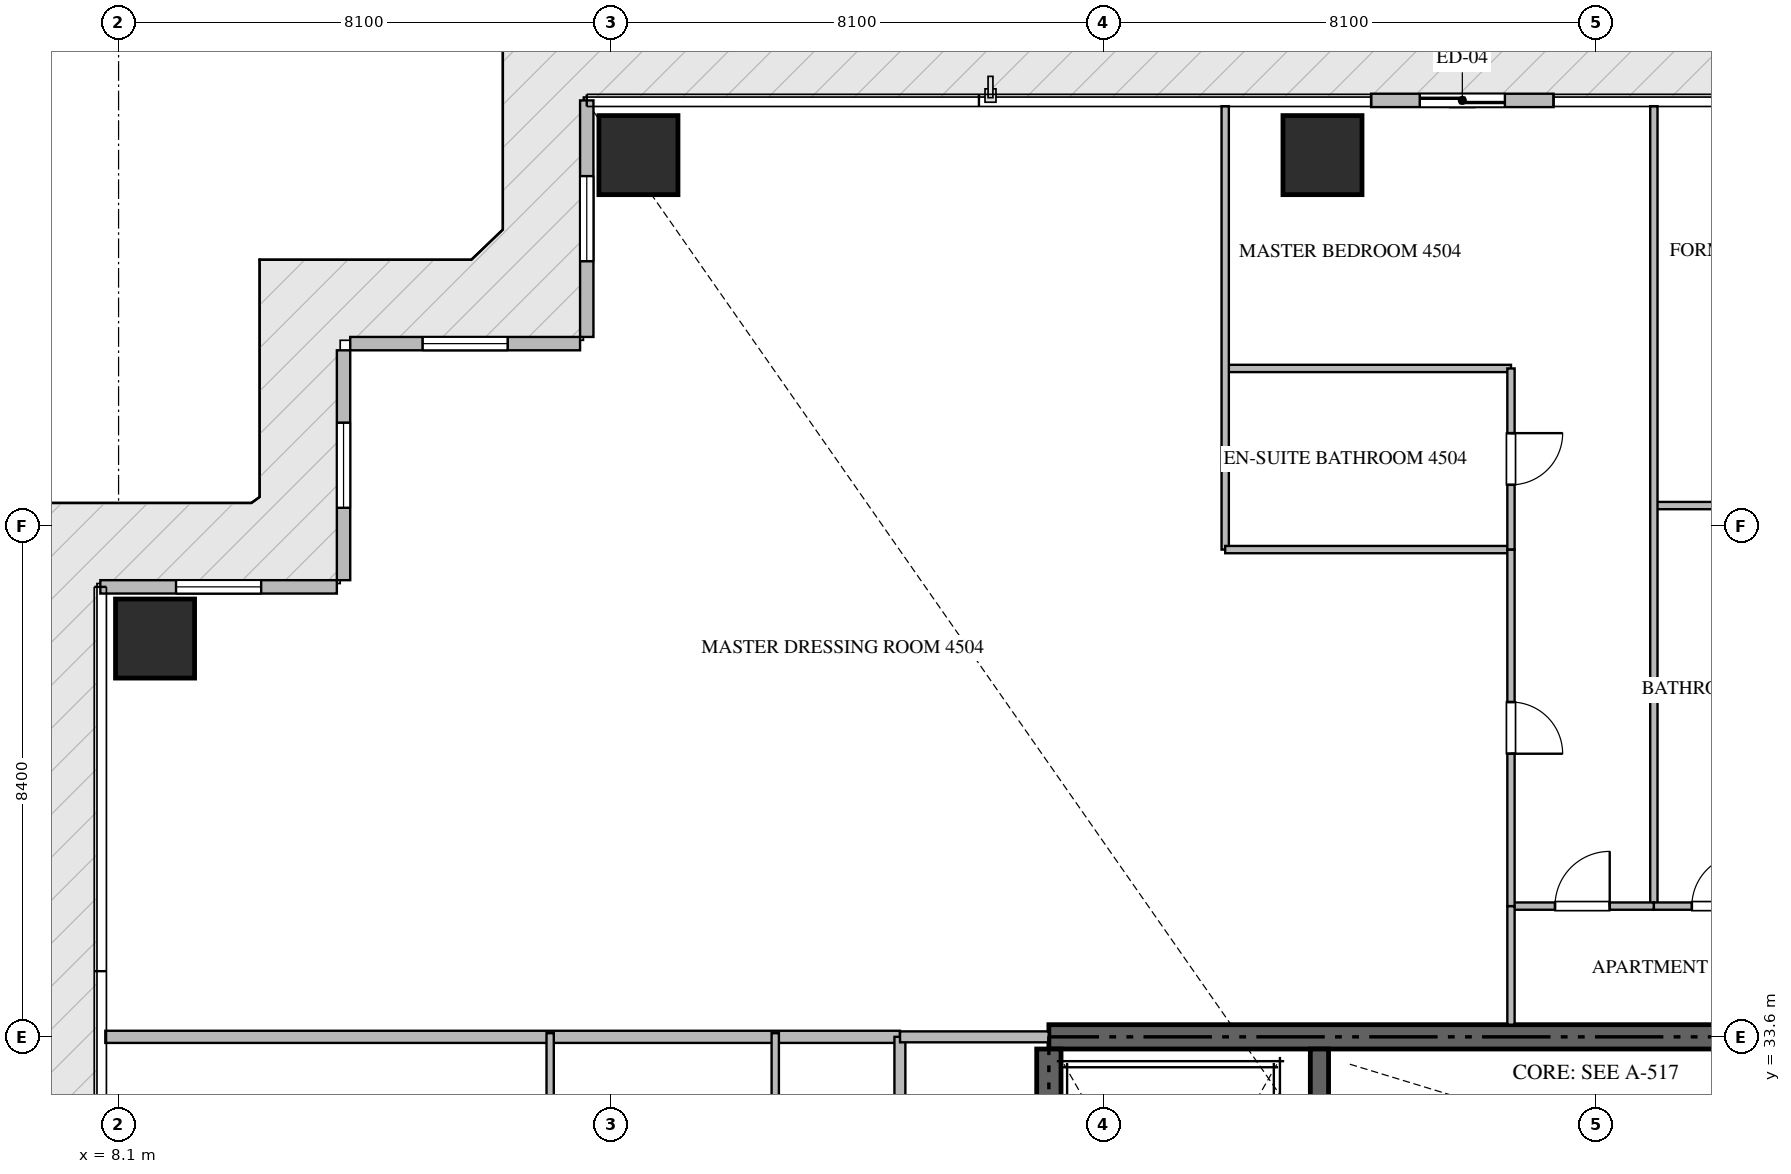
"""IFC4 building model, lengths in metres.
Left out: names, types, materials, properties, quantities, classifications, styles, units other than length and angle.
Written with IfcOpenShell. Run it as: python <this file> out.ifc"""

import sys

from ifc_helpers import new_model, si_unit, direction, frame, frame_2d, origin, origin_2d, place, context, subcontext, project, spatial, rectangle, extrude, source, transform, mapped, element, fill, save


model = new_model("IFC4")
c1 = context("Model", 3, precision=1e-05, world=origin(), true_north=direction((0.0, 1.0)))
c2 = subcontext(c1, "Body", "Model", "MODEL_VIEW")
j1 = project(units=[si_unit("LENGTHUNIT", "METRE"), si_unit("PLANEANGLEUNIT", "RADIAN")], contexts=[c1])
p1 = place(None, origin())
s1 = spatial("IfcSite", under=j1, at=p1, CompositionType="ELEMENT")
p2 = place(p1, origin())
s2 = spatial("IfcBuilding", under=s1, at=p2, CompositionType="ELEMENT")
p3 = place(p2, frame((0.0, 0.0, 180.15)))
s3 = spatial("IfcBuildingStorey", under=s2, at=p3, CompositionType="ELEMENT", Elevation=180.15)
p4 = place(p3, frame((41.4, 33.6, -0.26), z_axis=(0.0, 0.0, 1.0), x_axis=(-1.0, 0.0, 0.0)))
e1 = element("IfcWall", 1, at=p4, inside=s3, PredefinedType="SHEAR", context=c2, shape_type="SweptSolid", body=[
    extrude(rectangle(XDim=18.0, YDim=0.4, at=frame_2d((9.0, 0.0))), origin(), (0.0, 0.0, 1.0), 3.748),
])
p5 = place(p3, frame((23.4, 24.25, -0.26), z_axis=(0.0, 0.0, 1.0), x_axis=(0.0, 1.0, 0.0)))
e2 = element("IfcWall", 2, at=p5, inside=s3, PredefinedType="SHEAR", context=c2, shape_type="SweptSolid", body=[
    extrude(rectangle(XDim=9.15, YDim=0.4, at=frame_2d((4.575, 0.0))), origin(), (0.0, 0.0, 1.0), 3.748),
])
p6 = place(p3, frame((27.85, 23.55, -0.26), z_axis=(0.0, 0.0, 1.0), x_axis=(0.0, 1.0, 0.0)))
e3 = element("IfcWall", 3, at=p6, inside=s3, PredefinedType="SHEAR", context=c2, shape_type="SweptSolid", body=[
    extrude(rectangle(XDim=9.85, YDim=0.3, at=frame_2d((4.925, 0.0))), origin(), (0.0, 0.0, 1.0), 3.748),
])
m1 = source(origin(), c2, "Body", "SweptSolid", [
    extrude(rectangle(XDim=1.3, YDim=1.3, at=origin_2d()), origin(), (0.0, 0.0, 1.0), 3.75),
])
for number, where, z_axis, x_axis in (
    (4, (16.65, 48.1, -0.26), (0.0, 0.0, 1.0), (1.0, 0.0, 0.0)),
    (5, (27.9, 48.1, -0.26), (0.0, 0.0, 1.0), (1.0, 0.0, 0.0)),
    (6, (8.7, 40.15, -0.26), (0.0, 0.0, 1.0), (1.0, 0.0, 0.0)),
):
    element("IfcColumn", number, at=place(p3, frame(where, z_axis=z_axis, x_axis=x_axis)), inside=s3, PredefinedType="COLUMN", context=c2, shape_type="MappedRepresentation", body=[
        mapped(m1, transform((0.0, 0.0, 0.0), scale=1.0)),
    ])
p7 = place(p3, frame((31.7, 49.0, 0.0), z_axis=(0.0, 0.0, 1.0), x_axis=(-1.0, 0.0, 0.0)))
e7 = element("IfcWall", 7, at=p7, inside=s3, PredefinedType="ELEMENTEDWALL", context=c2, shape_type="SweptSolid", body=[
    extrude(rectangle(XDim=3.0, YDim=0.22, at=frame_2d((1.5, 0.0))), origin(), (0.0, 0.0, 1.0), 3.475),
])
p8 = place(p7, frame((0.8, 0.0, 0.0)))
e8 = element("IfcOpeningElement", 8, at=p8, cuts=e7, PredefinedType="OPENING", context=c2, shape_type="SweptSolid", body=[
    extrude(rectangle(XDim=1.4, YDim=2.25, at=frame_2d((0.7, 1.125))), frame((0.0, 0.12, 0.0), z_axis=(0.0, -1.0, 0.0), x_axis=(1.0, 0.0, 0.0)), (0.0, 0.0, 1.0), 0.24),
])
p9 = place(p3, frame((15.8, 49.0, 0.0), z_axis=(0.0, 0.0, 1.0), x_axis=(0.0, -1.0, 0.0)))
e9 = element("IfcWall", 9, at=p9, inside=s3, PredefinedType="ELEMENTEDWALL", context=c2, shape_type="SweptSolid", body=[
    extrude(rectangle(XDim=3.89, YDim=0.22, at=frame_2d((1.945, 0.0))), origin(), (0.0, 0.0, 1.0), 3.475),
])
p10 = place(p9, frame((1.245, 0.0, 0.65)))
e10 = element("IfcOpeningElement", 10, at=p10, cuts=e9, PredefinedType="OPENING", context=c2, shape_type="SweptSolid", body=[
    extrude(rectangle(XDim=1.4, YDim=2.05, at=frame_2d((0.7, 1.025))), frame((0.0, 0.12, 0.0), z_axis=(0.0, -1.0, 0.0), x_axis=(1.0, 0.0, 0.0)), (0.0, 0.0, 1.0), 0.24),
])
p11 = place(p3, frame((15.69, 45.0, 0.0), z_axis=(0.0, 0.0, 1.0), x_axis=(-1.0, 0.0, 0.0)))
e11 = element("IfcWall", 11, at=p11, inside=s3, PredefinedType="ELEMENTEDWALL", context=c2, shape_type="SweptSolid", body=[
    extrude(rectangle(XDim=3.78, YDim=0.22, at=frame_2d((1.89, 0.0))), origin(), (0.0, 0.0, 1.0), 3.475),
])
p12 = place(p11, frame((1.19, 0.0, 0.65)))
e12 = element("IfcOpeningElement", 12, at=p12, cuts=e11, PredefinedType="OPENING", context=c2, shape_type="SweptSolid", body=[
    extrude(rectangle(XDim=1.4, YDim=2.05, at=frame_2d((0.7, 1.025))), frame((0.0, 0.12, 0.0), z_axis=(0.0, -1.0, 0.0), x_axis=(1.0, 0.0, 0.0)), (0.0, 0.0, 1.0), 0.24),
])
p13 = place(p3, frame((11.8, 44.89, 0.0), z_axis=(0.0, 0.0, 1.0), x_axis=(0.0, -1.0, 0.0)))
e13 = element("IfcWall", 13, at=p13, inside=s3, PredefinedType="ELEMENTEDWALL", context=c2, shape_type="SweptSolid", body=[
    extrude(rectangle(XDim=3.78, YDim=0.22, at=frame_2d((1.89, 0.0))), origin(), (0.0, 0.0, 1.0), 3.475),
])
p14 = place(p13, frame((1.19, 0.0, 0.65)))
e14 = element("IfcOpeningElement", 14, at=p14, cuts=e13, PredefinedType="OPENING", context=c2, shape_type="SweptSolid", body=[
    extrude(rectangle(XDim=1.4, YDim=2.05, at=frame_2d((0.7, 1.025))), frame((0.0, 0.12, 0.0), z_axis=(0.0, -1.0, 0.0), x_axis=(1.0, 0.0, 0.0)), (0.0, 0.0, 1.0), 0.24),
])
p15 = place(p3, frame((11.69, 41.0, 0.0), z_axis=(0.0, 0.0, 1.0), x_axis=(-1.0, 0.0, 0.0)))
e15 = element("IfcWall", 15, at=p15, inside=s3, PredefinedType="ELEMENTEDWALL", context=c2, shape_type="SweptSolid", body=[
    extrude(rectangle(XDim=3.89, YDim=0.22, at=frame_2d((1.945, 0.0))), origin(), (0.0, 0.0, 1.0), 3.475),
])
p16 = place(p15, frame((1.245, 0.0, 0.65)))
e16 = element("IfcOpeningElement", 16, at=p16, cuts=e15, PredefinedType="OPENING", context=c2, shape_type="SweptSolid", body=[
    extrude(rectangle(XDim=1.4, YDim=2.05, at=frame_2d((0.7, 1.025))), frame((0.0, 0.12, 0.0), z_axis=(0.0, -1.0, 0.0), x_axis=(1.0, 0.0, 0.0)), (0.0, 0.0, 1.0), 0.24),
])
p17 = place(p3, frame((7.882, 33.6, 0.0), z_axis=(0.0, 0.0, 1.0), x_axis=(1.0, 0.0, 0.0)))
e17 = element("IfcWall", 17, at=p17, inside=s3, PredefinedType="PARTITIONING", context=c2, shape_type="SweptSolid", body=[
    extrude(rectangle(XDim=13.068, YDim=0.2, at=frame_2d((6.534, 0.0))), origin(), (0.0, 0.0, 1.0), 3.49),
])
p18 = place(p3, frame((20.95, 14.9, 0.0), z_axis=(0.0, 0.0, 1.0), x_axis=(0.0, 1.0, 0.0)))
e18 = element("IfcWall", 18, at=p18, inside=s3, PredefinedType="PARTITIONING", context=c2, shape_type="SweptSolid", body=[
    extrude(rectangle(XDim=18.7, YDim=0.18, at=frame_2d((9.35, 0.0))), origin(), (0.0, 0.0, 1.0), 3.49),
])
p19 = place(p18, frame((5.629, 0.0, 0.0)))
e19 = element("IfcOpeningElement", 19, at=p19, cuts=e18, PredefinedType="OPENING", context=c2, shape_type="SweptSolid", body=[
    extrude(rectangle(XDim=1.0, YDim=2.15, at=frame_2d((0.5, 1.075))), frame((0.0, 0.1, 0.0), z_axis=(0.0, -1.0, 0.0), x_axis=(1.0, 0.0, 0.0)), (0.0, 0.0, 1.0), 0.2),
])
p20 = place(p18, frame((10.709, 0.0, 0.0)))
e20 = element("IfcOpeningElement", 20, at=p20, cuts=e18, PredefinedType="OPENING", context=c2, shape_type="SweptSolid", body=[
    extrude(rectangle(XDim=1.0, YDim=2.15, at=frame_2d((0.5, 1.075))), frame((0.0, 0.1, 0.0), z_axis=(0.0, -1.0, 0.0), x_axis=(1.0, 0.0, 0.0)), (0.0, 0.0, 1.0), 0.2),
])
p21 = place(p3, frame((20.952, 33.6, 0.0), z_axis=(0.0, 0.0, 1.0), x_axis=(1.0, 0.0, 0.0)))
e21 = element("IfcWall", 21, at=p21, inside=s3, PredefinedType="PARTITIONING", context=c2, shape_type="SweptSolid", body=[
    extrude(rectangle(XDim=2.446, YDim=0.18, at=frame_2d((1.223, 0.0))), origin(), (0.0, 0.0, 1.0), 3.49),
])
p22 = place(p3, frame((33.35, 42.337, 0.0), z_axis=(0.0, 0.0, 1.0), x_axis=(1.0, 0.0, 0.0)))
e22 = element("IfcWall", 22, at=p22, inside=s3, PredefinedType="PARTITIONING", context=c2, shape_type="SweptSolid", body=[
    extrude(rectangle(XDim=5.15, YDim=0.12, at=frame_2d((2.575, 0.0))), origin(), (0.0, 0.0, 1.0), 3.49),
])
p23 = place(p3, frame((33.35, 48.905, 0.0), z_axis=(0.0, 0.0, 1.0), x_axis=(0.0, -1.0, 0.0)))
e23 = element("IfcWall", 23, at=p23, inside=s3, PredefinedType="PARTITIONING", context=c2, shape_type="SweptSolid", body=[
    extrude(rectangle(XDim=13.155, YDim=0.12, at=frame_2d((6.578, 0.0))), origin(), (0.0, 0.0, 1.0), 3.49),
])
p24 = place(p3, frame((33.35, 35.75, 0.0), z_axis=(0.0, 0.0, 1.0), x_axis=(1.0, 0.0, 0.0)))
e24 = element("IfcWall", 24, at=p24, inside=s3, PredefinedType="PARTITIONING", context=c2, shape_type="SweptSolid", body=[
    extrude(rectangle(XDim=2.1, YDim=0.12, at=frame_2d((1.05, 0.0))), origin(), (0.0, 0.0, 1.0), 3.49),
])
p25 = place(p24, frame((0.625, 0.0, 0.0)))
e25 = element("IfcOpeningElement", 25, at=p25, cuts=e24, PredefinedType="OPENING", context=c2, shape_type="SweptSolid", body=[
    extrude(rectangle(XDim=0.85, YDim=2.1, at=frame_2d((0.425, 1.05))), frame((0.0, 0.07, 0.0), z_axis=(0.0, -1.0, 0.0), x_axis=(1.0, 0.0, 0.0)), (0.0, 0.0, 1.0), 0.14),
])
p26 = place(p3, frame((31.0, 35.75, 0.0), z_axis=(0.0, 0.0, 1.0), x_axis=(1.0, 0.0, 0.0)))
e26 = element("IfcWall", 26, at=p26, inside=s3, PredefinedType="PARTITIONING", context=c2, shape_type="SweptSolid", body=[
    extrude(rectangle(XDim=2.348, YDim=0.12, at=frame_2d((1.174, 0.0))), origin(), (0.0, 0.0, 1.0), 3.49),
])
p27 = place(p26, frame((0.724, 0.0, 0.0)))
e27 = element("IfcOpeningElement", 27, at=p27, cuts=e26, PredefinedType="OPENING", context=c2, shape_type="SweptSolid", body=[
    extrude(rectangle(XDim=0.9, YDim=2.1, at=frame_2d((0.45, 1.05))), frame((0.0, 0.07, 0.0), z_axis=(0.0, -1.0, 0.0), x_axis=(1.0, 0.0, 0.0)), (0.0, 0.0, 1.0), 0.14),
])
p28 = place(p3, frame((26.3, 44.592, 0.0), z_axis=(0.0, 0.0, 1.0), x_axis=(1.0, 0.0, 0.0)))
e28 = element("IfcWall", 28, at=p28, inside=s3, PredefinedType="PARTITIONING", context=c2, shape_type="SweptSolid", body=[
    extrude(rectangle(XDim=4.7, YDim=0.12, at=frame_2d((2.35, 0.0))), origin(), (0.0, 0.0, 1.0), 3.49),
])
p29 = place(p3, frame((26.3, 48.905, 0.0), z_axis=(0.0, 0.0, 1.0), x_axis=(0.0, -1.0, 0.0)))
e29 = element("IfcWall", 29, at=p29, inside=s3, PredefinedType="PARTITIONING", context=c2, shape_type="SweptSolid", body=[
    extrude(rectangle(XDim=7.292, YDim=0.12, at=frame_2d((3.646, 0.0))), origin(), (0.0, 0.0, 1.0), 3.49),
])
p30 = place(p3, frame((26.3, 41.613, 0.0), z_axis=(0.0, 0.0, 1.0), x_axis=(1.0, 0.0, 0.0)))
e30 = element("IfcWall", 30, at=p30, inside=s3, PredefinedType="PARTITIONING", context=c2, shape_type="SweptSolid", body=[
    extrude(rectangle(XDim=4.7, YDim=0.12, at=frame_2d((2.35, 0.0))), origin(), (0.0, 0.0, 1.0), 3.49),
])
p31 = place(p3, frame((31.0, 44.592, 0.0), z_axis=(0.0, 0.0, 1.0), x_axis=(0.0, -1.0, 0.0)))
e31 = element("IfcWall", 31, at=p31, inside=s3, PredefinedType="PARTITIONING", context=c2, shape_type="SweptSolid", body=[
    extrude(rectangle(XDim=2.979, YDim=0.12, at=frame_2d((1.49, 0.0))), origin(), (0.0, 0.0, 1.0), 3.49),
])
p32 = place(p31, frame((1.064, 0.0, 0.0)))
e32 = element("IfcOpeningElement", 32, at=p32, cuts=e31, PredefinedType="OPENING", context=c2, shape_type="SweptSolid", body=[
    extrude(rectangle(XDim=0.85, YDim=2.1, at=frame_2d((0.425, 1.05))), frame((0.0, 0.07, 0.0), z_axis=(0.0, -1.0, 0.0), x_axis=(1.0, 0.0, 0.0)), (0.0, 0.0, 1.0), 0.14),
])
p33 = place(p3, frame((31.0, 41.611, 0.0), z_axis=(0.0, 0.0, 1.0), x_axis=(0.0, -1.0, 0.0)))
e33 = element("IfcWall", 33, at=p33, inside=s3, PredefinedType="PARTITIONING", context=c2, shape_type="SweptSolid", body=[
    extrude(rectangle(XDim=5.861, YDim=0.12, at=frame_2d((2.931, 0.0))), origin(), (0.0, 0.0, 1.0), 3.49),
])
p34 = place(p33, frame((2.505, 0.0, 0.0)))
e34 = element("IfcOpeningElement", 34, at=p34, cuts=e33, PredefinedType="OPENING", context=c2, shape_type="SweptSolid", body=[
    extrude(rectangle(XDim=0.85, YDim=2.1, at=frame_2d((0.425, 1.05))), frame((0.0, 0.07, 0.0), z_axis=(0.0, -1.0, 0.0), x_axis=(1.0, 0.0, 0.0)), (0.0, 0.0, 1.0), 0.14),
])
p35 = place(p3, frame((31.0, 35.748, 0.0), z_axis=(0.0, 0.0, 1.0), x_axis=(0.0, -1.0, 0.0)))
e35 = element("IfcWall", 35, at=p35, inside=s3, PredefinedType="PARTITIONING", context=c2, shape_type="SweptSolid", body=[
    extrude(rectangle(XDim=1.948, YDim=0.12, at=frame_2d((0.974, 0.0))), origin(), (0.0, 0.0, 1.0), 3.49),
])
for number, where, z_axis, x_axis in (
    (36, (15.198, 27.8, 0.0), (0.0, 0.0, 1.0), (0.0, 1.0, 0.0)),
    (37, (18.9, 27.8, 0.0), (0.0, 0.0, 1.0), (0.0, 1.0, 0.0)),
):
    element("IfcWall", number, at=place(p3, frame(where, z_axis=z_axis, x_axis=x_axis)), inside=s3, PredefinedType="PARTITIONING", context=c2, shape_type="SweptSolid", body=[
        extrude(rectangle(XDim=5.86, YDim=0.12, at=frame_2d((2.93, 0.0))), origin(), (0.0, 0.0, 1.0), 3.49),
    ])
m2 = source(origin(), c2, "Body", "SweptSolid", [
    extrude(rectangle(XDim=1.4, YDim=2.25, at=frame_2d((0.7, 1.125))), frame((0.0, 0.025, 0.0), z_axis=(0.0, -1.0, 0.0), x_axis=(1.0, 0.0, 0.0)), (0.0, 0.0, 1.0), 0.05),
])
p36 = place(p8, origin())
e38 = element("IfcDoor", 38, at=p36, inside=s3, OperationType="SLIDING_TO_LEFT", PredefinedType="DOOR", context=c2, shape_type="MappedRepresentation", body=[
    mapped(m2, transform((0.0, 0.0, 0.0), scale=1.0)),
])
fill(e8, e38)
m3 = source(origin(), c2, "Body", "SweptSolid", [
    extrude(rectangle(XDim=1.4, YDim=2.05, at=frame_2d((0.7, 1.025))), frame((0.0, 0.03, 0.0), z_axis=(0.0, -1.0, 0.0), x_axis=(1.0, 0.0, 0.0)), (0.0, 0.0, 1.0), 0.06),
])
p37 = place(p10, origin())
e39 = element("IfcWindow", 39, at=p37, inside=s3, PartitioningType="SINGLE_PANEL", PredefinedType="WINDOW", context=c2, shape_type="MappedRepresentation", body=[
    mapped(m3, transform((0.0, 0.0, 0.0), scale=1.0)),
])
fill(e10, e39)
p38 = place(p12, origin())
e40 = element("IfcWindow", 40, at=p38, inside=s3, PartitioningType="SINGLE_PANEL", PredefinedType="WINDOW", context=c2, shape_type="MappedRepresentation", body=[
    mapped(m3, transform((0.0, 0.0, 0.0), scale=1.0)),
])
fill(e12, e40)
p39 = place(p14, origin())
e41 = element("IfcWindow", 41, at=p39, inside=s3, PartitioningType="SINGLE_PANEL", PredefinedType="WINDOW", context=c2, shape_type="MappedRepresentation", body=[
    mapped(m3, transform((0.0, 0.0, 0.0), scale=1.0)),
])
fill(e14, e41)
p40 = place(p16, origin())
e42 = element("IfcWindow", 42, at=p40, inside=s3, PartitioningType="SINGLE_PANEL", PredefinedType="WINDOW", context=c2, shape_type="MappedRepresentation", body=[
    mapped(m3, transform((0.0, 0.0, 0.0), scale=1.0)),
])
fill(e16, e42)
m4 = source(origin(), c2, "Body", "SweptSolid", [
    extrude(rectangle(XDim=0.85, YDim=2.1, at=frame_2d((0.425, 1.05))), frame((0.0, 0.025, 0.0), z_axis=(0.0, -1.0, 0.0), x_axis=(1.0, 0.0, 0.0)), (0.0, 0.0, 1.0), 0.05),
])
p41 = place(p25, origin())
e43 = element("IfcDoor", 43, at=p41, inside=s3, OperationType="SINGLE_SWING_RIGHT", PredefinedType="DOOR", context=c2, shape_type="MappedRepresentation", body=[
    mapped(m4, transform((0.0, 0.0, 0.0), scale=1.0)),
])
fill(e25, e43)
m5 = source(origin(), c2, "Body", "SweptSolid", [
    extrude(rectangle(XDim=0.9, YDim=2.1, at=frame_2d((0.45, 1.05))), frame((0.0, 0.025, 0.0), z_axis=(0.0, -1.0, 0.0), x_axis=(1.0, 0.0, 0.0)), (0.0, 0.0, 1.0), 0.05),
])
p42 = place(p27, origin())
e44 = element("IfcDoor", 44, at=p42, inside=s3, OperationType="SINGLE_SWING_RIGHT", PredefinedType="DOOR", context=c2, shape_type="MappedRepresentation", body=[
    mapped(m5, transform((0.0, 0.0, 0.0), scale=1.0)),
])
fill(e27, e44)
p43 = place(p32, origin())
e45 = element("IfcDoor", 45, at=p43, inside=s3, OperationType="SINGLE_SWING_LEFT", PredefinedType="DOOR", context=c2, shape_type="MappedRepresentation", body=[
    mapped(m4, transform((0.0, 0.0, 0.0), scale=1.0)),
])
fill(e32, e45)
p44 = place(p34, origin())
e46 = element("IfcDoor", 46, at=p44, inside=s3, OperationType="SINGLE_SWING_RIGHT", PredefinedType="DOOR", context=c2, shape_type="MappedRepresentation", body=[
    mapped(m4, transform((0.0, 0.0, 0.0), scale=1.0)),
])
fill(e34, e46)
save(model, sys.argv[1])
